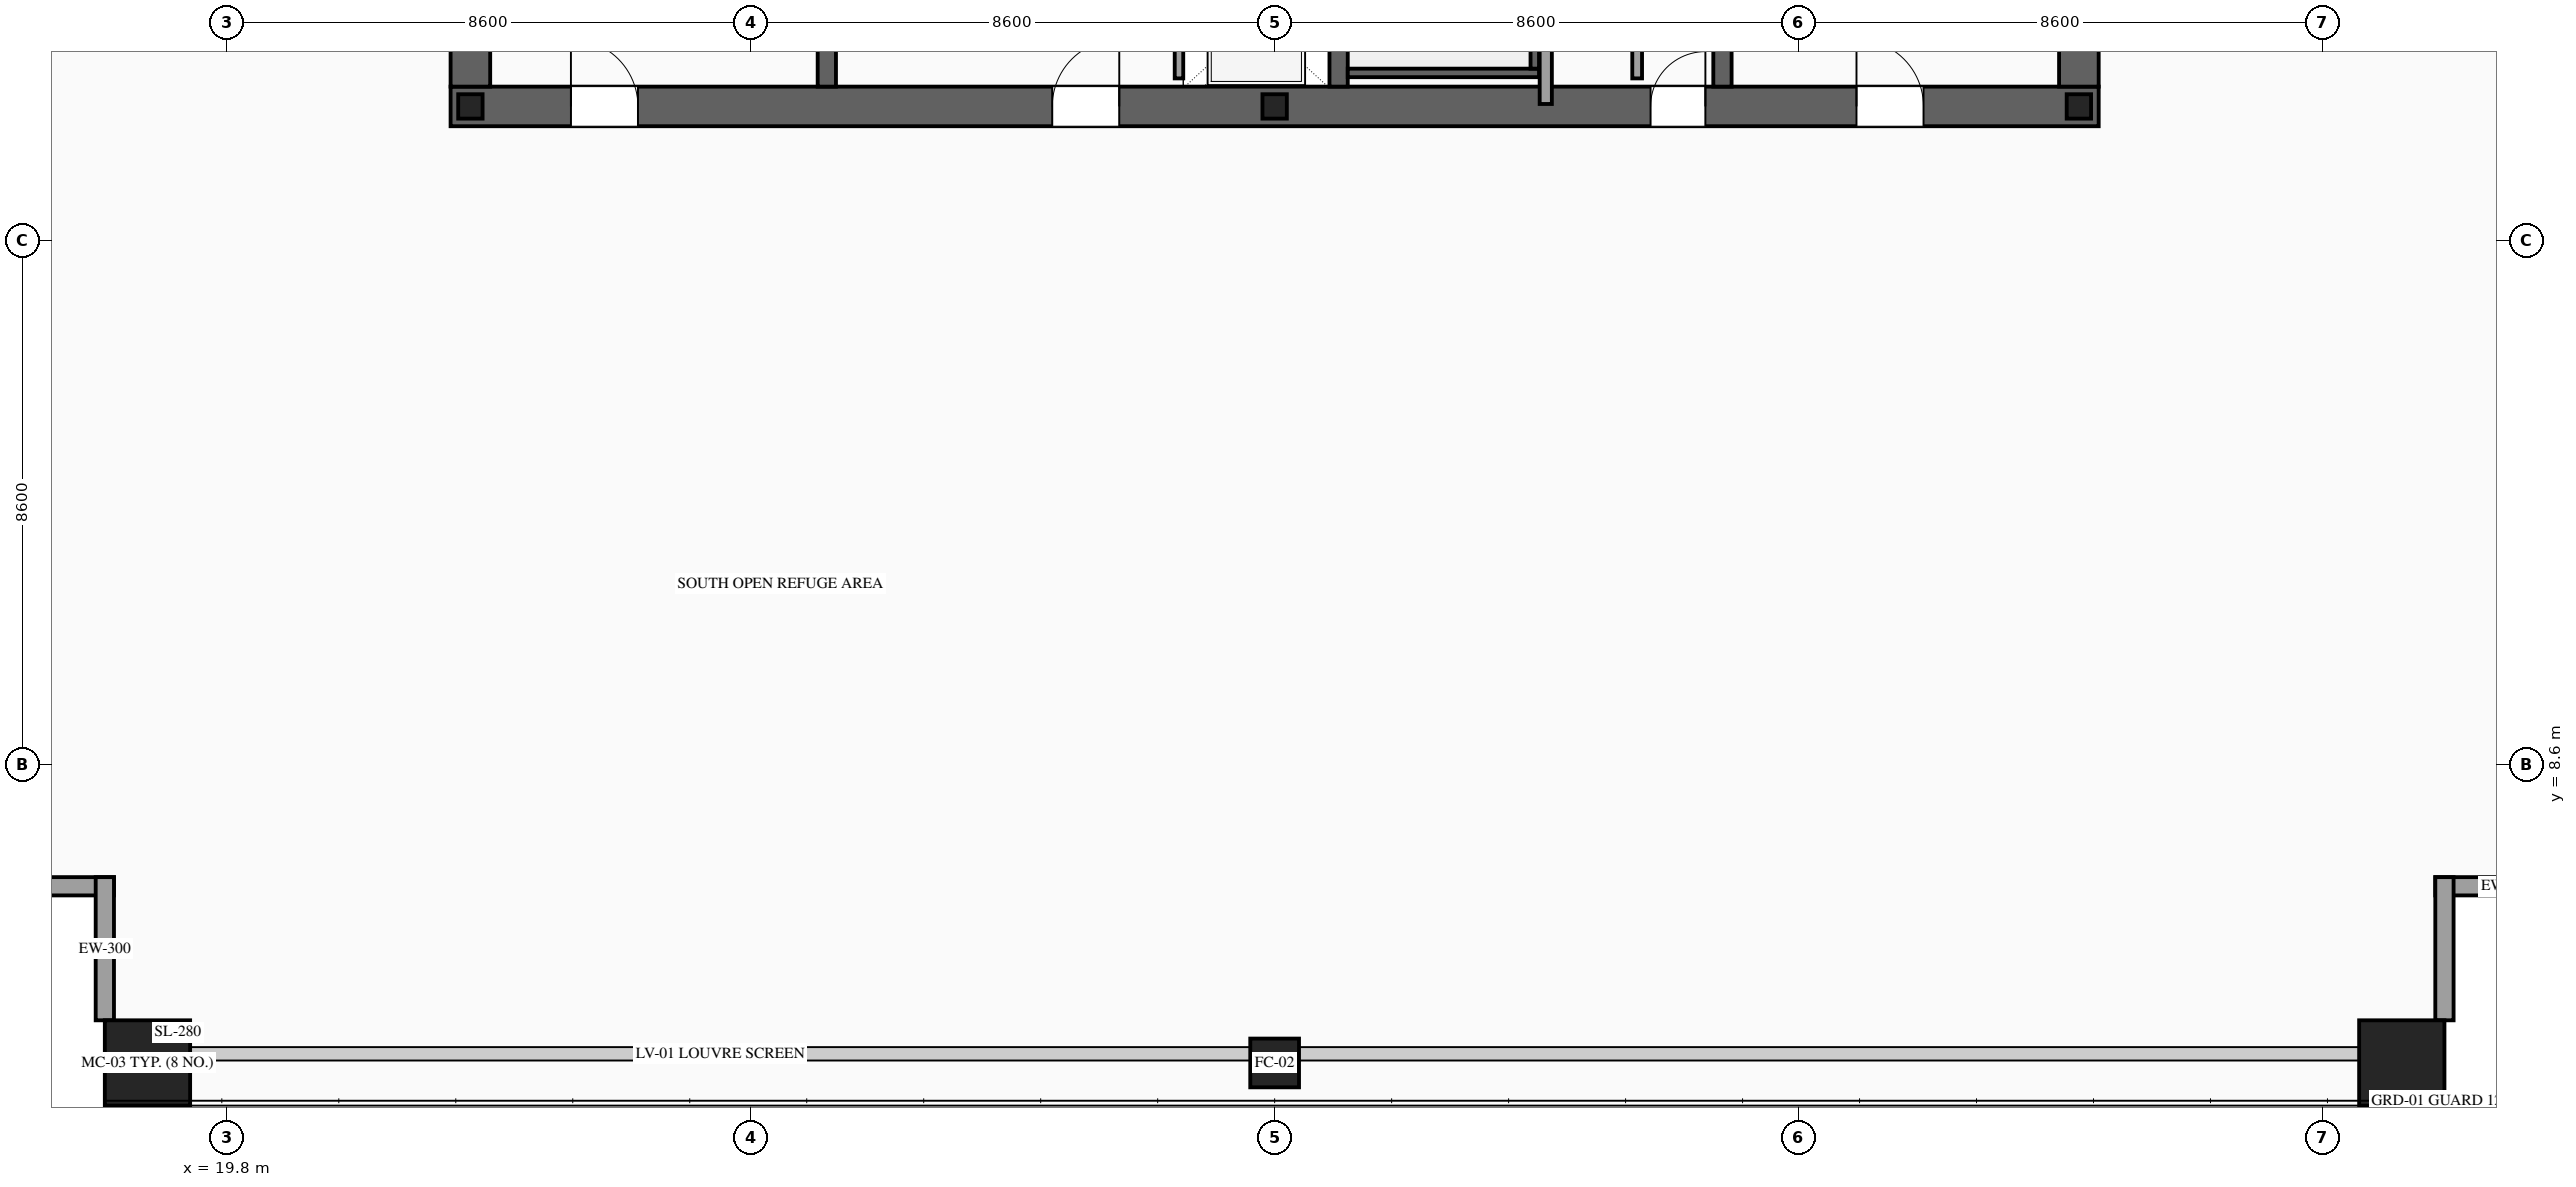
"""IFC4 building model, lengths in metres.
Left out: names, types, materials, properties, quantities, classifications, styles, units other than length and angle.
Written with IfcOpenShell. Run it as: python <this file> out.ifc"""

import sys

from ifc_helpers import new_model, si_unit, direction, frame, frame_2d, origin, origin_2d, place, context, subcontext, project, spatial, rectangle, hollow_rectangle, i_section, extrude, source, transform, mapped, element, fill, save


model = new_model("IFC4")
c1 = context("Model", 3, precision=1e-05, world=origin(), true_north=direction((0.0, 1.0)))
c2 = subcontext(c1, "Body", "Model", "MODEL_VIEW")
j1 = project(units=[si_unit("LENGTHUNIT", "METRE"), si_unit("PLANEANGLEUNIT", "RADIAN")], contexts=[c1])
p1 = place(None, origin())
s1 = spatial("IfcSite", under=j1, at=p1, CompositionType="ELEMENT")
p2 = place(p1, origin())
s2 = spatial("IfcBuilding", under=s1, at=p2, CompositionType="ELEMENT")
p3 = place(p2, frame((0.0, 0.0, 176.4)))
s3 = spatial("IfcBuildingStorey", under=s2, at=p3, CompositionType="ELEMENT", Elevation=176.4)
p4 = place(p3, frame((23.475, 19.4, 0.0), z_axis=(0.0, 0.0, 1.0), x_axis=(1.0, 0.0, 0.0)))
e1 = element("IfcWall", 1, at=p4, inside=s3, PredefinedType="SHEAR", context=c2, shape_type="SweptSolid", body=[
    extrude(rectangle(XDim=27.05, YDim=0.65, at=frame_2d((13.525, 0.0))), origin(), (0.0, 0.0, 1.0), 4.6),
])
p5 = place(p4, frame((1.975, 0.0, 0.0)))
e2 = element("IfcOpeningElement", 2, at=p5, cuts=e1, PredefinedType="OPENING", context=c2, shape_type="SweptSolid", body=[
    extrude(rectangle(XDim=1.1, YDim=2.2, at=frame_2d((0.55, 1.1))), frame((0.0, 0.34, 0.0), z_axis=(0.0, -1.0, 0.0), x_axis=(1.0, 0.0, 0.0)), (0.0, 0.0, 1.0), 0.68),
])
p6 = place(p4, frame((9.875, 0.0, 0.0)))
e3 = element("IfcOpeningElement", 3, at=p6, cuts=e1, PredefinedType="OPENING", context=c2, shape_type="SweptSolid", body=[
    extrude(rectangle(XDim=1.1, YDim=2.2, at=frame_2d((0.55, 1.1))), frame((0.0, 0.34, 0.0), z_axis=(0.0, -1.0, 0.0), x_axis=(1.0, 0.0, 0.0)), (0.0, 0.0, 1.0), 0.68),
])
p7 = place(p4, frame((23.075, 0.0, 0.0)))
e4 = element("IfcOpeningElement", 4, at=p7, cuts=e1, PredefinedType="OPENING", context=c2, shape_type="SweptSolid", body=[
    extrude(rectangle(XDim=1.1, YDim=2.2, at=frame_2d((0.55, 1.1))), frame((0.0, 0.34, 0.0), z_axis=(0.0, -1.0, 0.0), x_axis=(1.0, 0.0, 0.0)), (0.0, 0.0, 1.0), 0.68),
])
p8 = place(p4, frame((19.695, 0.0, 0.0)))
e5 = element("IfcOpeningElement", 5, at=p8, cuts=e1, PredefinedType="OPENING", context=c2, shape_type="SweptSolid", body=[
    extrude(rectangle(XDim=0.9, YDim=2.15, at=frame_2d((0.45, 1.075))), frame((0.0, 0.34, 0.0), z_axis=(0.0, -1.0, 0.0), x_axis=(1.0, 0.0, 0.0)), (0.0, 0.0, 1.0), 0.68),
])
m1 = source(origin(), c2, "Body", "SweptSolid", [
    extrude(rectangle(XDim=12.15, YDim=0.65, at=frame_2d((6.075, 0.0))), origin(), (0.0, 0.0, 1.0), 4.6),
])
for number, where, z_axis, x_axis in (
    (6, (23.8, 19.725, 0.0), (0.0, 0.0, 1.0), (0.0, 1.0, 0.0)),
    (7, (50.2, 19.725, 0.0), (0.0, 0.0, 1.0), (0.0, 1.0, 0.0)),
):
    element("IfcWall", number, at=place(p3, frame(where, z_axis=z_axis, x_axis=x_axis)), inside=s3, PredefinedType="SHEAR", context=c2, shape_type="MappedRepresentation", body=[
        mapped(m1, transform((0.0, 0.0, 0.0), scale=1.0)),
    ])
m2 = source(origin(), c2, "Body", "SweptSolid", [
    extrude(rectangle(XDim=12.15, YDim=0.3, at=frame_2d((6.075, 0.0))), origin(), (0.0, 0.0, 1.0), 4.6),
])
for number, where, z_axis, x_axis in (
    (8, (29.65, 19.725, 0.0), (0.0, 0.0, 1.0), (0.0, 1.0, 0.0)),
    (9, (38.05, 19.725, 0.0), (0.0, 0.0, 1.0), (0.0, 1.0, 0.0)),
    (10, (44.35, 19.725, 0.0), (0.0, 0.0, 1.0), (0.0, 1.0, 0.0)),
):
    element("IfcWall", number, at=place(p3, frame(where, z_axis=z_axis, x_axis=x_axis)), inside=s3, PredefinedType="SOLIDWALL", context=c2, shape_type="MappedRepresentation", body=[
        mapped(m2, transform((0.0, 0.0, 0.0), scale=1.0)),
    ])
m3 = source(origin(), c2, "Body", "SweptSolid", [
    extrude(i_section(OverallWidth=0.4, OverallDepth=0.4, WebThickness=0.013, FlangeThickness=0.021, at=origin_2d()), origin(), (0.0, 0.0, 1.0), 4.6),
])
for number, where, z_axis, x_axis in (
    (11, (23.8, 19.4, 0.0), (0.0, 0.0, 1.0), (1.0, 0.0, 0.0)),
    (12, (37.0, 19.4, 0.0), (0.0, 0.0, 1.0), (1.0, 0.0, 0.0)),
    (13, (50.2, 19.4, 0.0), (0.0, 0.0, 1.0), (1.0, 0.0, 0.0)),
):
    element("IfcColumn", number, at=place(p3, frame(where, z_axis=z_axis, x_axis=x_axis)), inside=s3, PredefinedType="COLUMN", context=c2, shape_type="MappedRepresentation", body=[
        mapped(m3, transform((0.0, 0.0, 0.0), scale=1.0)),
    ])
m4 = source(origin(), c2, "Body", "SweptSolid", [
    extrude(hollow_rectangle(XDim=1.4, YDim=1.4, WallThickness=0.06, at=origin_2d()), origin(), (0.0, 0.0, 1.0), 4.6),
])
p9 = place(p3, frame((18.5, 3.7, 0.0), z_axis=(0.0, 0.0, 1.0), x_axis=(1.0, 0.0, 0.0)))
e14 = element("IfcColumn", 14, at=p9, inside=s3, PredefinedType="COLUMN", context=c2, shape_type="MappedRepresentation", body=[
    mapped(m4, transform((0.0, 0.0, 0.0), scale=1.0)),
])
m5 = source(origin(), c2, "Body", "SweptSolid", [
    extrude(hollow_rectangle(XDim=0.8, YDim=0.8, WallThickness=0.036, at=origin_2d()), origin(), (0.0, 0.0, 1.0), 4.6),
])
p10 = place(p3, frame((37.0, 3.7, 0.0), z_axis=(0.0, 0.0, 1.0), x_axis=(1.0, 0.0, 0.0)))
e15 = element("IfcColumn", 15, at=p10, inside=s3, PredefinedType="COLUMN", context=c2, shape_type="MappedRepresentation", body=[
    mapped(m5, transform((0.0, 0.0, 0.0), scale=1.0)),
])
p11 = place(p3, frame((55.5, 3.7, 0.0), z_axis=(0.0, 0.0, 1.0), x_axis=(1.0, 0.0, 0.0)))
e16 = element("IfcColumn", 16, at=p11, inside=s3, PredefinedType="COLUMN", context=c2, shape_type="MappedRepresentation", body=[
    mapped(m4, transform((0.0, 0.0, 0.0), scale=1.0)),
])
m6 = source(origin(), c2, "Body", "SweptSolid", [
    extrude(rectangle(XDim=2.35, YDim=0.3, at=frame_2d((1.175, 0.0))), origin(), (0.0, 0.0, 1.0), 4.38),
])
p12 = place(p3, frame((15.6, 6.6, 0.0), z_axis=(0.0, 0.0, 1.0), x_axis=(1.0, 0.0, 0.0)))
e17 = element("IfcWall", 17, at=p12, inside=s3, PredefinedType="SOLIDWALL", context=c2, shape_type="MappedRepresentation", body=[
    mapped(m6, transform((0.0, 0.0, 0.0), scale=1.0)),
])
m7 = source(origin(), c2, "Body", "SweptSolid", [
    extrude(rectangle(XDim=2.35, YDim=0.3, at=frame_2d((1.175, 0.0))), origin(), (0.0, 0.0, 1.0), 4.38),
])
p13 = place(p3, frame((17.8, 6.75, 0.0), z_axis=(0.0, 0.0, 1.0), x_axis=(0.0, -1.0, 0.0)))
e18 = element("IfcWall", 18, at=p13, inside=s3, PredefinedType="SOLIDWALL", context=c2, shape_type="MappedRepresentation", body=[
    mapped(m7, transform((0.0, 0.0, 0.0), scale=1.0)),
])
p14 = place(p3, frame((56.05, 6.6, 0.0), z_axis=(0.0, 0.0, 1.0), x_axis=(1.0, 0.0, 0.0)))
e19 = element("IfcWall", 19, at=p14, inside=s3, PredefinedType="SOLIDWALL", context=c2, shape_type="MappedRepresentation", body=[
    mapped(m6, transform((0.0, 0.0, 0.0), scale=1.0)),
])
p15 = place(p3, frame((56.2, 4.4, 0.0), z_axis=(0.0, 0.0, 1.0), x_axis=(0.0, 1.0, 0.0)))
e20 = element("IfcWall", 20, at=p15, inside=s3, PredefinedType="SOLIDWALL", context=c2, shape_type="MappedRepresentation", body=[
    mapped(m7, transform((0.0, 0.0, 0.0), scale=1.0)),
])
p16 = place(p3, frame((35.43, 19.86, 0.0), z_axis=(0.0, 0.0, 1.0), x_axis=(0.0, 1.0, 0.0)))
e21 = element("IfcWall", 21, at=p16, inside=s3, PredefinedType="SOLIDWALL", context=c2, shape_type="SweptSolid", body=[
    extrude(rectangle(XDim=2.04, YDim=0.14, at=frame_2d((1.02, 0.0))), origin(), (0.0, 0.0, 1.0), 4.38),
])
p17 = place(p16, frame((0.47, 0.0, 0.0)))
e22 = element("IfcOpeningElement", 22, at=p17, cuts=e21, PredefinedType="OPENING", context=c2, shape_type="SweptSolid", body=[
    extrude(rectangle(XDim=1.1, YDim=2.2, at=frame_2d((0.55, 1.1))), frame((0.0, 0.085, 0.0), z_axis=(0.0, -1.0, 0.0), x_axis=(1.0, 0.0, 0.0)), (0.0, 0.0, 1.0), 0.17),
])
m8 = source(origin(), c2, "Body", "SweptSolid", [
    extrude(rectangle(XDim=3.14, YDim=0.14, at=frame_2d((1.57, 0.0))), origin(), (0.0, 0.0, 1.0), 4.38),
])
p18 = place(p3, frame((38.2, 19.95, 0.0), z_axis=(0.0, 0.0, 1.0), x_axis=(1.0, 0.0, 0.0)))
e23 = element("IfcWall", 23, at=p18, inside=s3, PredefinedType="SOLIDWALL", context=c2, shape_type="MappedRepresentation", body=[
    mapped(m8, transform((0.0, 0.0, 0.0), scale=1.0)),
])
m9 = source(origin(), c2, "Body", "SweptSolid", [
    extrude(rectangle(XDim=8.94, YDim=0.14, at=frame_2d((4.47, 0.0))), origin(), (0.0, 0.0, 1.0), 4.38),
])
p19 = place(p3, frame((41.27, 20.02, 0.0), z_axis=(0.0, 0.0, 1.0), x_axis=(0.0, 1.0, 0.0)))
e24 = element("IfcWall", 24, at=p19, inside=s3, PredefinedType="SOLIDWALL", context=c2, shape_type="MappedRepresentation", body=[
    mapped(m9, transform((0.0, 0.0, 0.0), scale=1.0)),
])
m10 = source(origin(), c2, "Body", "SweptSolid", [
    extrude(rectangle(XDim=1.34, YDim=0.16, at=frame_2d((0.67, 0.0))), origin(), (0.0, 0.0, 1.0), 4.38),
])
p20 = place(p3, frame((42.95, 19.86, 0.0), z_axis=(0.0, 0.0, 1.0), x_axis=(0.0, 1.0, 0.0)))
e25 = element("IfcWall", 25, at=p20, inside=s3, PredefinedType="PARTITIONING", context=c2, shape_type="MappedRepresentation", body=[
    mapped(m10, transform((0.0, 0.0, 0.0), scale=1.0)),
])
m11 = source(origin(), c2, "Body", "SweptSolid", [
    extrude(rectangle(XDim=12.72, YDim=0.2, at=frame_2d((6.36, 0.0))), origin(), (0.0, 0.0, 1.0), 4.38),
])
p21 = place(p3, frame((41.45, 19.44, 0.0), z_axis=(0.0, 0.0, 1.0), x_axis=(0.0, 1.0, 0.0)))
e26 = element("IfcWall", 26, at=p21, inside=s3, PredefinedType="PARTITIONING", context=c2, shape_type="MappedRepresentation", body=[
    mapped(m11, transform((0.0, 0.0, 0.0), scale=1.0)),
])
m12 = source(origin(), c2, "Body", "SweptSolid", [
    extrude(rectangle(XDim=1.1, YDim=2.2, at=frame_2d((0.55, 1.1))), frame((0.0, 0.025, 0.0), z_axis=(0.0, -1.0, 0.0), x_axis=(1.0, 0.0, 0.0)), (0.0, 0.0, 1.0), 0.05),
])
p22 = place(p5, origin())
e27 = element("IfcDoor", 27, at=p22, inside=s3, OperationType="SINGLE_SWING_LEFT", PredefinedType="DOOR", context=c2, shape_type="MappedRepresentation", body=[
    mapped(m12, transform((0.0, 0.0, 0.0), scale=1.0)),
])
fill(e2, e27)
p23 = place(p6, origin())
e28 = element("IfcDoor", 28, at=p23, inside=s3, OperationType="SINGLE_SWING_RIGHT", PredefinedType="DOOR", context=c2, shape_type="MappedRepresentation", body=[
    mapped(m12, transform((0.0, 0.0, 0.0), scale=1.0)),
])
fill(e3, e28)
p24 = place(p7, origin())
e29 = element("IfcDoor", 29, at=p24, inside=s3, OperationType="SINGLE_SWING_LEFT", PredefinedType="DOOR", context=c2, shape_type="MappedRepresentation", body=[
    mapped(m12, transform((0.0, 0.0, 0.0), scale=1.0)),
])
fill(e4, e29)
m13 = source(origin(), c2, "Body", "SweptSolid", [
    extrude(rectangle(XDim=0.9, YDim=2.15, at=frame_2d((0.45, 1.075))), frame((0.0, 0.025, 0.0), z_axis=(0.0, -1.0, 0.0), x_axis=(1.0, 0.0, 0.0)), (0.0, 0.0, 1.0), 0.05),
])
p25 = place(p8, origin())
e30 = element("IfcDoor", 30, at=p25, inside=s3, OperationType="SINGLE_SWING_RIGHT", PredefinedType="DOOR", context=c2, shape_type="MappedRepresentation", body=[
    mapped(m13, transform((0.0, 0.0, 0.0), scale=1.0)),
])
fill(e5, e30)
save(model, sys.argv[1])
